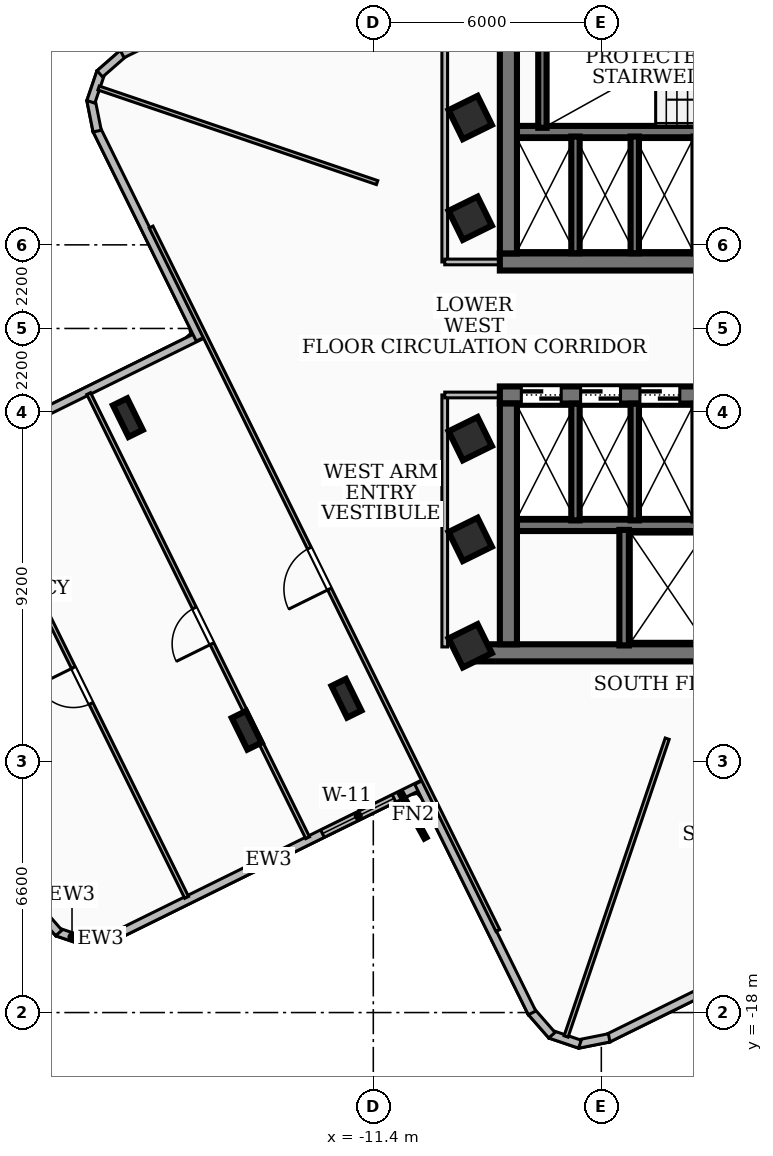
"""IFC4 building model, lengths in metres.
Left out: names, types, materials, properties, quantities, classifications, styles, units other than length and angle.
Written with IfcOpenShell. Run it as: python <this file> out.ifc"""

import sys

from ifc_helpers import new_model, si_unit, direction, frame, frame_2d, origin, origin_2d, place, context, subcontext, project, spatial, rectangle, i_section, extrude, element, fill, save


model = new_model("IFC4")
c1 = context("Model", 3, precision=1e-05, world=origin(), true_north=direction((0.0, 1.0)))
c2 = subcontext(c1, "Body", "Model", "MODEL_VIEW")
j1 = project(units=[si_unit("LENGTHUNIT", "METRE"), si_unit("PLANEANGLEUNIT", "RADIAN")], contexts=[c1])
p1 = place(None, origin())
s1 = spatial("IfcSite", under=j1, at=p1, CompositionType="ELEMENT")
p2 = place(p1, origin())
s2 = spatial("IfcBuilding", under=s1, at=p2, CompositionType="ELEMENT")
p3 = place(p2, frame((0.0, 0.0, 192.6)))
s3 = spatial("IfcBuildingStorey", under=s2, at=p3, CompositionType="ELEMENT", Elevation=192.6)
p4 = place(p3, frame((8.07, 1.75, 0.0), z_axis=(0.0, 0.0, 1.0), x_axis=(-1.0, 0.0, 0.0)))
e1 = element("IfcWall", 1, at=p4, inside=s3, PredefinedType="SHEAR", context=c2, shape_type="SweptSolid", body=[
    extrude(rectangle(XDim=16.14, YDim=0.45, at=frame_2d((8.07, 0.0))), origin(), (0.0, 0.0, 1.0), 3.2),
])
p5 = place(p4, frame((7.45, 0.0, 0.0)))
e2 = element("IfcOpeningElement", 2, at=p5, cuts=e1, PredefinedType="OPENING", context=c2, shape_type="SweptSolid", body=[
    extrude(rectangle(XDim=1.0, YDim=2.1, at=frame_2d((0.5, 1.05))), frame((0.0, 0.235, 0.0), z_axis=(0.0, -1.0, 0.0), x_axis=(1.0, 0.0, 0.0)), (0.0, 0.0, 1.0), 0.47),
])
p6 = place(p4, frame((3.4, 0.0, 0.0)))
e3 = element("IfcOpeningElement", 3, at=p6, cuts=e1, PredefinedType="OPENING", context=c2, shape_type="SweptSolid", body=[
    extrude(rectangle(XDim=0.9, YDim=2.06, at=frame_2d((0.45, 1.03))), frame((0.0, 0.235, 0.0), z_axis=(0.0, -1.0, 0.0), x_axis=(1.0, 0.0, 0.0)), (0.0, 0.0, 1.0), 0.47),
])
p7 = place(p4, frame((1.1, 0.0, 0.0)))
e4 = element("IfcOpeningElement", 4, at=p7, cuts=e1, PredefinedType="OPENING", context=c2, shape_type="SweptSolid", body=[
    extrude(rectangle(XDim=0.9, YDim=2.06, at=frame_2d((0.45, 1.03))), frame((0.0, 0.235, 0.0), z_axis=(0.0, -1.0, 0.0), x_axis=(1.0, 0.0, 0.0)), (0.0, 0.0, 1.0), 0.47),
])
p8 = place(p3, frame((-7.845, 1.975, 0.0), z_axis=(0.0, 0.0, 1.0), x_axis=(0.0, 1.0, 0.0)))
e5 = element("IfcWall", 5, at=p8, inside=s3, PredefinedType="SHEAR", context=c2, shape_type="SweptSolid", body=[
    extrude(rectangle(XDim=6.335, YDim=0.45, at=frame_2d((3.167, 0.0))), origin(), (0.0, 0.0, 1.0), 3.2),
])
p9 = place(p3, frame((7.62, 5.18, 0.0), z_axis=(0.0, 0.0, 1.0), x_axis=(-1.0, 0.0, 0.0)))
e6 = element("IfcWall", 6, at=p9, inside=s3, PredefinedType="SOLIDWALL", context=c2, shape_type="SweptSolid", body=[
    extrude(rectangle(XDim=15.24, YDim=0.3, at=frame_2d((7.62, 0.0))), origin(), (0.0, 0.0, 1.0), 3.2),
])
p10 = place(p9, frame((5.77, 0.0, 0.0)))
e7 = element("IfcOpeningElement", 7, at=p10, cuts=e6, PredefinedType="OPENING", context=c2, shape_type="SweptSolid", body=[
    extrude(rectangle(XDim=1.1, YDim=2.15, at=frame_2d((0.55, 1.075))), frame((0.0, 0.16, 0.0), z_axis=(0.0, -1.0, 0.0), x_axis=(1.0, 0.0, 0.0)), (0.0, 0.0, 1.0), 0.32),
])
p11 = place(p9, frame((2.97, 0.0, 0.0)))
e8 = element("IfcOpeningElement", 8, at=p11, cuts=e6, PredefinedType="OPENING", context=c2, shape_type="SweptSolid", body=[
    extrude(rectangle(XDim=1.1, YDim=2.15, at=frame_2d((0.55, 1.075))), frame((0.0, 0.16, 0.0), z_axis=(0.0, -1.0, 0.0), x_axis=(1.0, 0.0, 0.0)), (0.0, 0.0, 1.0), 0.32),
])
p12 = place(p9, frame((7.97, 0.0, 0.0)))
e9 = element("IfcOpeningElement", 9, at=p12, cuts=e6, PredefinedType="OPENING", context=c2, shape_type="SweptSolid", body=[
    extrude(rectangle(XDim=1.0, YDim=2.1, at=frame_2d((0.5, 1.05))), frame((0.0, 0.16, 0.0), z_axis=(0.0, -1.0, 0.0), x_axis=(1.0, 0.0, 0.0)), (0.0, 0.0, 1.0), 0.32),
])
p13 = place(p3, frame((8.78, -8.535, 0.0), z_axis=(0.0, 0.0, 1.0), x_axis=(-1.0, 0.0, 0.0)))
e10 = element("IfcWall", 10, at=p13, inside=s3, PredefinedType="SHEAR", context=c2, shape_type="SweptSolid", body=[
    extrude(rectangle(XDim=17.56, YDim=0.45, at=frame_2d((8.78, 0.0))), origin(), (0.0, 0.0, 1.0), 3.2),
])
p14 = place(p3, frame((-8.07, -1.75, 0.0), z_axis=(0.0, 0.0, 1.0), x_axis=(1.0, 0.0, 0.0)))
e11 = element("IfcWall", 11, at=p14, inside=s3, PredefinedType="SHEAR", context=c2, shape_type="SweptSolid", body=[
    extrude(rectangle(XDim=16.14, YDim=0.45, at=frame_2d((8.07, 0.0))), origin(), (0.0, 0.0, 1.0), 3.2),
])
p15 = place(p14, frame((7.45, 0.0, 0.0)))
e12 = element("IfcOpeningElement", 12, at=p15, cuts=e11, PredefinedType="OPENING", context=c2, shape_type="SweptSolid", body=[
    extrude(rectangle(XDim=1.0, YDim=2.1, at=frame_2d((0.5, 1.05))), frame((0.0, 0.235, 0.0), z_axis=(0.0, -1.0, 0.0), x_axis=(1.0, 0.0, 0.0)), (0.0, 0.0, 1.0), 0.47),
])
p16 = place(p14, frame((12.65, 0.0, 0.0)))
e13 = element("IfcOpeningElement", 13, at=p16, cuts=e11, PredefinedType="OPENING", context=c2, shape_type="SweptSolid", body=[
    extrude(rectangle(XDim=0.9, YDim=2.06, at=frame_2d((0.45, 1.03))), frame((0.0, 0.235, 0.0), z_axis=(0.0, -1.0, 0.0), x_axis=(1.0, 0.0, 0.0)), (0.0, 0.0, 1.0), 0.47),
])
p17 = place(p14, frame((0.565, 0.0, 0.0)))
e14 = element("IfcOpeningElement", 14, at=p17, cuts=e11, PredefinedType="OPENING", context=c2, shape_type="SweptSolid", body=[
    extrude(rectangle(XDim=1.05, YDim=2.15, at=frame_2d((0.525, 1.075))), frame((0.0, 0.235, 0.0), z_axis=(0.0, -1.0, 0.0), x_axis=(1.0, 0.0, 0.0)), (0.0, 0.0, 1.0), 0.47),
])
p18 = place(p14, frame((2.125, 0.0, 0.0)))
e15 = element("IfcOpeningElement", 15, at=p18, cuts=e11, PredefinedType="OPENING", context=c2, shape_type="SweptSolid", body=[
    extrude(rectangle(XDim=1.05, YDim=2.15, at=frame_2d((0.525, 1.075))), frame((0.0, 0.235, 0.0), z_axis=(0.0, -1.0, 0.0), x_axis=(1.0, 0.0, 0.0)), (0.0, 0.0, 1.0), 0.47),
])
p19 = place(p14, frame((3.685, 0.0, 0.0)))
e16 = element("IfcOpeningElement", 16, at=p19, cuts=e11, PredefinedType="OPENING", context=c2, shape_type="SweptSolid", body=[
    extrude(rectangle(XDim=1.05, YDim=2.15, at=frame_2d((0.525, 1.075))), frame((0.0, 0.235, 0.0), z_axis=(0.0, -1.0, 0.0), x_axis=(1.0, 0.0, 0.0)), (0.0, 0.0, 1.0), 0.47),
])
p20 = place(p3, frame((-7.845, -8.31, 0.0), z_axis=(0.0, 0.0, 1.0), x_axis=(0.0, 1.0, 0.0)))
e17 = element("IfcWall", 17, at=p20, inside=s3, PredefinedType="SHEAR", context=c2, shape_type="SweptSolid", body=[
    extrude(rectangle(XDim=6.335, YDim=0.45, at=frame_2d((3.167, 0.0))), origin(), (0.0, 0.0, 1.0), 3.2),
])
p21 = place(p3, frame((-7.62, -5.18, 0.0), z_axis=(0.0, 0.0, 1.0), x_axis=(1.0, 0.0, 0.0)))
e18 = element("IfcWall", 18, at=p21, inside=s3, PredefinedType="SOLIDWALL", context=c2, shape_type="SweptSolid", body=[
    extrude(rectangle(XDim=15.24, YDim=0.3, at=frame_2d((7.62, 0.0))), origin(), (0.0, 0.0, 1.0), 3.2),
])
p22 = place(p21, frame((5.77, 0.0, 0.0)))
e19 = element("IfcOpeningElement", 19, at=p22, cuts=e18, PredefinedType="OPENING", context=c2, shape_type="SweptSolid", body=[
    extrude(rectangle(XDim=1.1, YDim=2.15, at=frame_2d((0.55, 1.075))), frame((0.0, 0.16, 0.0), z_axis=(0.0, -1.0, 0.0), x_axis=(1.0, 0.0, 0.0)), (0.0, 0.0, 1.0), 0.32),
])
p23 = place(p21, frame((7.97, 0.0, 0.0)))
e20 = element("IfcOpeningElement", 20, at=p23, cuts=e18, PredefinedType="OPENING", context=c2, shape_type="SweptSolid", body=[
    extrude(rectangle(XDim=1.0, YDim=2.1, at=frame_2d((0.5, 1.05))), frame((0.0, 0.16, 0.0), z_axis=(0.0, -1.0, 0.0), x_axis=(1.0, 0.0, 0.0)), (0.0, 0.0, 1.0), 0.32),
])
p24 = place(p3, frame((-6.95, 5.28, 0.0), z_axis=(0.0, 0.0, 1.0), x_axis=(0.0, 1.0, 0.0)))
e21 = element("IfcWall", 21, at=p24, inside=s3, PredefinedType="SOLIDWALL", context=c2, shape_type="SweptSolid", body=[
    extrude(rectangle(XDim=3.06, YDim=0.22, at=frame_2d((1.53, 0.0))), origin(), (0.0, 0.0, 1.0), 3.2),
])
p25 = place(p3, frame((-4.8, -8.34, 0.0), z_axis=(0.0, 0.0, 1.0), x_axis=(0.0, 1.0, 0.0)))
e22 = element("IfcWall", 22, at=p25, inside=s3, PredefinedType="SOLIDWALL", context=c2, shape_type="SweptSolid", body=[
    extrude(rectangle(XDim=3.04, YDim=0.25, at=frame_2d((1.52, 0.0))), origin(), (0.0, 0.0, 1.0), 3.2),
])
for number, where, z_axis, x_axis in (
    (23, (-6.08, 1.98, 0.0), (0.0, 0.0, 1.0), (0.0, 1.0, 0.0)),
    (24, (-4.52, 1.98, 0.0), (0.0, 0.0, 1.0), (0.0, 1.0, 0.0)),
    (25, (-6.08, -5.05, 0.0), (0.0, 0.0, 1.0), (0.0, 1.0, 0.0)),
    (26, (-4.52, -5.05, 0.0), (0.0, 0.0, 1.0), (0.0, 1.0, 0.0)),
):
    element("IfcWall", number, at=place(p3, frame(where, z_axis=z_axis, x_axis=x_axis)), inside=s3, PredefinedType="SOLIDWALL", context=c2, shape_type="SweptSolid", body=[
        extrude(rectangle(XDim=3.07, YDim=0.22, at=frame_2d((1.535, 0.0))), origin(), (0.0, 0.0, 1.0), 3.2),
    ])
for number, where, z_axis, x_axis in (
    (27, (-8.85, -5.55, 0.0), (0.0, 0.0, 1.0), (0.897, 0.442, 0.0)),
    (28, (-8.85, -2.9, 0.0), (0.0, 0.0, 1.0), (0.897, 0.442, 0.0)),
    (29, (-8.85, 2.9, 0.0), (0.0, 0.0, 1.0), (0.897, 0.442, 0.0)),
    (30, (-8.85, 5.55, 0.0), (0.0, 0.0, 1.0), (0.897, 0.442, 0.0)),
    (31, (-8.85, -8.35, 0.0), (0.0, 0.0, 1.0), (0.897, 0.442, 0.0)),
):
    element("IfcColumn", number, at=place(p3, frame(where, z_axis=z_axis, x_axis=x_axis)), inside=s3, PredefinedType="COLUMN", context=c2, shape_type="SweptSolid", body=[
        extrude(rectangle(XDim=0.85, YDim=0.85, at=origin_2d()), origin(), (0.0, 0.0, 1.0), 3.6),
    ])
for number, where, z_axis, x_axis in (
    (32, (-17.858, -2.346, 0.0), (0.0, 0.0, 1.0), (0.897, 0.442, 0.0)),
    (33, (-12.106, -9.731, 0.0), (0.0, 0.0, 1.0), (0.897, 0.442, 0.0)),
    (34, (-14.731, -10.573, 0.0), (0.0, 0.0, 1.0), (0.897, 0.442, 0.0)),
):
    element("IfcColumn", number, at=place(p3, frame(where, z_axis=z_axis, x_axis=x_axis)), inside=s3, PredefinedType="COLUMN", context=c2, shape_type="SweptSolid", body=[
        extrude(i_section(OverallWidth=0.418, OverallDepth=0.927, WebThickness=0.019, FlangeThickness=0.032, at=origin_2d()), origin(), (0.0, 0.0, 1.0), 3.6),
    ])
p26 = place(p3, frame((-10.092, -11.988, 0.0), z_axis=(0.0, 0.0, 1.0), x_axis=(-0.89699971925, -0.442031111649, 0.0)))
e35 = element("IfcWall", 35, at=p26, inside=s3, PredefinedType="SOLIDWALL", context=c2, shape_type="SweptSolid", body=[
    extrude(rectangle(XDim=9.058, YDim=0.22, at=frame_2d((4.529, 0.0))), origin(), (0.0, 0.0, 1.0), 3.2),
])
p27 = place(p26, frame((0.85, 0.0, 0.85)))
e36 = element("IfcOpeningElement", 36, at=p27, cuts=e35, PredefinedType="OPENING", context=c2, shape_type="SweptSolid", body=[
    extrude(rectangle(XDim=2.1, YDim=1.6, at=frame_2d((1.05, 0.8))), frame((0.0, 0.12, 0.0), z_axis=(0.0, -1.0, 0.0), x_axis=(1.0, 0.0, 0.0)), (0.0, 0.0, 1.0), 0.24),
])
p28 = place(p3, frame((-18.17, -15.976, 0.0), z_axis=(0.0, 0.0, 1.0), x_axis=(-0.980804908934, -0.194991616769, 0.0)))
e37 = element("IfcWall", 37, at=p28, inside=s3, PredefinedType="SOLIDWALL", context=c2, shape_type="SweptSolid", body=[
    extrude(rectangle(XDim=0.835, YDim=0.22, at=frame_2d((0.417, 0.0))), origin(), (0.0, 0.0, 1.0), 3.2),
])
p29 = place(p3, frame((-18.94, -16.142, 0.0), z_axis=(0.0, 0.0, 1.0), x_axis=(-0.94703210012, 0.321138912843, 0.0)))
e38 = element("IfcWall", 38, at=p29, inside=s3, PredefinedType="SOLIDWALL", context=c2, shape_type="SweptSolid", body=[
    extrude(rectangle(XDim=0.82, YDim=0.22, at=frame_2d((0.41, 0.0))), origin(), (0.0, 0.0, 1.0), 3.2),
])
p30 = place(p3, frame((-19.676, -15.906, 0.0), z_axis=(0.0, 0.0, 1.0), x_axis=(-0.658255916404, 0.752794227209, 0.0)))
e39 = element("IfcWall", 39, at=p30, inside=s3, PredefinedType="SOLIDWALL", context=c2, shape_type="SweptSolid", body=[
    extrude(rectangle(XDim=0.834, YDim=0.22, at=frame_2d((0.417, 0.0))), origin(), (0.0, 0.0, 1.0), 3.2),
])
p31 = place(p3, frame((-24.044, -4.171, 0.0), z_axis=(0.0, 0.0, 1.0), x_axis=(0.896935893297, 0.442160608055, 0.0)))
e40 = element("IfcWall", 40, at=p31, inside=s3, PredefinedType="SOLIDWALL", context=c2, shape_type="SweptSolid", body=[
    extrude(rectangle(XDim=9.058, YDim=0.22, at=frame_2d((4.529, 0.0))), origin(), (0.0, 0.0, 1.0), 3.2),
])
p32 = place(p3, frame((-15.96, -0.284, 0.0), z_axis=(0.0, 0.0, 1.0), x_axis=(-0.442004580174, 0.897012793167, 0.0)))
e41 = element("IfcWall", 41, at=p32, inside=s3, PredefinedType="SOLIDWALL", context=c2, shape_type="SweptSolid", body=[
    extrude(rectangle(XDim=6.158, YDim=0.22, at=frame_2d((3.079, 0.0))), origin(), (0.0, 0.0, 1.0), 3.2),
])
p33 = place(p3, frame((-18.666, 5.193, 0.0), z_axis=(0.0, 0.0, 1.0), x_axis=(-0.19532881852, 0.980737810353, 0.0)))
e42 = element("IfcWall", 42, at=p33, inside=s3, PredefinedType="SOLIDWALL", context=c2, shape_type="SweptSolid", body=[
    extrude(rectangle(XDim=0.835, YDim=0.22, at=frame_2d((0.417, 0.0))), origin(), (0.0, 0.0, 1.0), 3.2),
])
p34 = place(p3, frame((-18.832, 5.963, 0.0), z_axis=(0.0, 0.0, 1.0), x_axis=(0.320509908962, 0.947245162699, 0.0)))
e43 = element("IfcWall", 43, at=p34, inside=s3, PredefinedType="SOLIDWALL", context=c2, shape_type="SweptSolid", body=[
    extrude(rectangle(XDim=0.82, YDim=0.22, at=frame_2d((0.41, 0.0))), origin(), (0.0, 0.0, 1.0), 3.2),
])
p35 = place(p3, frame((-18.596, 6.7, 0.0), z_axis=(0.0, 0.0, 1.0), x_axis=(0.752794227209, 0.658255916404, 0.0)))
e44 = element("IfcWall", 44, at=p35, inside=s3, PredefinedType="SOLIDWALL", context=c2, shape_type="SweptSolid", body=[
    extrude(rectangle(XDim=0.834, YDim=0.22, at=frame_2d((0.417, 0.0))), origin(), (0.0, 0.0, 1.0), 3.2),
])
p36 = place(p3, frame((-18.009, 7.222, 0.0), z_axis=(0.0, 0.0, 1.0), x_axis=(0.896927600032, 0.44217743079, 0.0)))
e45 = element("IfcWall", 45, at=p36, inside=s3, PredefinedType="SOLIDWALL", context=c2, shape_type="SweptSolid", body=[
    extrude(rectangle(XDim=6.758, YDim=0.22, at=frame_2d((3.379, 0.0))), origin(), (0.0, 0.0, 1.0), 3.2),
])
p37 = place(p3, frame((0.284, -15.96, 0.0), z_axis=(0.0, 0.0, 1.0), x_axis=(-0.897012793167, -0.442004580174, 0.0)))
e46 = element("IfcWall", 46, at=p37, inside=s3, PredefinedType="SOLIDWALL", context=c2, shape_type="SweptSolid", body=[
    extrude(rectangle(XDim=6.158, YDim=0.22, at=frame_2d((3.079, 0.0))), origin(), (0.0, 0.0, 1.0), 3.2),
])
p38 = place(p3, frame((-5.193, -18.666, 0.0), z_axis=(0.0, 0.0, 1.0), x_axis=(-0.980737810353, -0.19532881852, 0.0)))
e47 = element("IfcWall", 47, at=p38, inside=s3, PredefinedType="SOLIDWALL", context=c2, shape_type="SweptSolid", body=[
    extrude(rectangle(XDim=0.835, YDim=0.22, at=frame_2d((0.417, 0.0))), origin(), (0.0, 0.0, 1.0), 3.2),
])
p39 = place(p3, frame((-5.963, -18.832, 0.0), z_axis=(0.0, 0.0, 1.0), x_axis=(-0.947245162699, 0.320509908962, 0.0)))
e48 = element("IfcWall", 48, at=p39, inside=s3, PredefinedType="SOLIDWALL", context=c2, shape_type="SweptSolid", body=[
    extrude(rectangle(XDim=0.82, YDim=0.22, at=frame_2d((0.41, 0.0))), origin(), (0.0, 0.0, 1.0), 3.2),
])
p40 = place(p3, frame((-6.7, -18.596, 0.0), z_axis=(0.0, 0.0, 1.0), x_axis=(-0.658255916404, 0.752794227209, 0.0)))
e49 = element("IfcWall", 49, at=p40, inside=s3, PredefinedType="SOLIDWALL", context=c2, shape_type="SweptSolid", body=[
    extrude(rectangle(XDim=0.834, YDim=0.22, at=frame_2d((0.417, 0.0))), origin(), (0.0, 0.0, 1.0), 3.2),
])
p41 = place(p3, frame((-7.222, -18.009, 0.0), z_axis=(0.0, 0.0, 1.0), x_axis=(-0.44217743079, 0.896927600032, 0.0)))
e50 = element("IfcWall", 50, at=p41, inside=s3, PredefinedType="SOLIDWALL", context=c2, shape_type="SweptSolid", body=[
    extrude(rectangle(XDim=6.758, YDim=0.22, at=frame_2d((3.379, 0.0))), origin(), (0.0, 0.0, 1.0), 3.2),
])
p42 = place(p3, frame((-9.52, 1.75, 0.0), z_axis=(0.0, 0.0, 1.0), x_axis=(0.0, 1.0, 0.0)))
e51 = element("IfcWall", 51, at=p42, inside=s3, PredefinedType="PARTITIONING", context=c2, shape_type="SweptSolid", body=[
    extrude(rectangle(XDim=6.63, YDim=0.15, at=frame_2d((3.315, 0.0))), origin(), (0.0, 0.0, 1.0), 3.2),
])
p43 = place(p3, frame((-7.85, 1.75, 0.0), z_axis=(0.0, 0.0, 1.0), x_axis=(-1.0, 0.0, 0.0)))
e52 = element("IfcWall", 52, at=p43, inside=s3, PredefinedType="PARTITIONING", context=c2, shape_type="SweptSolid", body=[
    extrude(rectangle(XDim=1.67, YDim=0.15, at=frame_2d((0.835, 0.0))), origin(), (0.0, 0.0, 1.0), 2.43),
])
p44 = place(p3, frame((-9.52, -8.38, 0.0), z_axis=(0.0, 0.0, 1.0), x_axis=(0.0, 1.0, 0.0)))
e53 = element("IfcWall", 53, at=p44, inside=s3, PredefinedType="PARTITIONING", context=c2, shape_type="SweptSolid", body=[
    extrude(rectangle(XDim=6.63, YDim=0.15, at=frame_2d((3.315, 0.0))), origin(), (0.0, 0.0, 1.0), 2.504),
])
p45 = place(p3, frame((-7.85, -1.75, 0.0), z_axis=(0.0, 0.0, 1.0), x_axis=(-1.0, 0.0, 0.0)))
e54 = element("IfcWall", 54, at=p45, inside=s3, PredefinedType="PARTITIONING", context=c2, shape_type="SweptSolid", body=[
    extrude(rectangle(XDim=1.67, YDim=0.15, at=frame_2d((0.835, 0.0))), origin(), (0.0, 0.0, 1.0), 2.43),
])
p46 = place(p3, frame((-11.3, 3.838, 0.0), z_axis=(0.0, 0.0, 1.0), x_axis=(-0.946882857271, 0.321578691158, 0.0)))
e55 = element("IfcWall", 55, at=p46, inside=s3, PredefinedType="PARTITIONING", context=c2, shape_type="SweptSolid", body=[
    extrude(rectangle(XDim=7.74, YDim=0.11, at=frame_2d((3.87, 0.0))), origin(), (0.0, 0.0, 1.0), 3.2),
])
p47 = place(p3, frame((-3.666, -10.794, 0.0), z_axis=(0.0, 0.0, 1.0), x_axis=(-0.32157793417, -0.946883114357, 0.0)))
e56 = element("IfcWall", 56, at=p47, inside=s3, PredefinedType="PARTITIONING", context=c2, shape_type="SweptSolid", body=[
    extrude(rectangle(XDim=8.274, YDim=0.11, at=frame_2d((4.137, 0.0))), origin(), (0.0, 0.0, 1.0), 3.2),
])
p48 = place(p3, frame((-8.122, -15.843, 0.0), z_axis=(0.0, 0.0, 1.0), x_axis=(-0.442129285211, 0.896951333774, 0.0)))
e57 = element("IfcWall", 57, at=p48, inside=s3, PredefinedType="PARTITIONING", context=c2, shape_type="SweptSolid", body=[
    extrude(rectangle(XDim=20.639, YDim=0.11, at=frame_2d((10.319, 0.0))), origin(), (0.0, 0.0, 1.0), 2.504),
])
p49 = place(p48, frame((10.02, 0.0, 0.0)))
e58 = element("IfcOpeningElement", 58, at=p49, cuts=e57, PredefinedType="OPENING", context=c2, shape_type="SweptSolid", body=[
    extrude(rectangle(XDim=1.2, YDim=2.1, at=frame_2d((0.6, 1.05))), frame((0.0, 0.065, 0.0), z_axis=(0.0, -1.0, 0.0), x_axis=(1.0, 0.0, 0.0)), (0.0, 0.0, 1.0), 0.13),
])
p50 = place(p3, frame((-13.128, -13.4, 0.0), z_axis=(0.0, 0.0, 1.0), x_axis=(-0.442139902385, 0.896946100231, 0.0)))
e59 = element("IfcWall", 59, at=p50, inside=s3, PredefinedType="PARTITIONING", context=c2, shape_type="SweptSolid", body=[
    extrude(rectangle(XDim=13.03, YDim=0.11, at=frame_2d((6.515, 0.0))), origin(), (0.0, 0.0, 1.0), 2.504),
])
p51 = place(p50, frame((5.69, 0.0, 0.0)))
e60 = element("IfcOpeningElement", 60, at=p51, cuts=e59, PredefinedType="OPENING", context=c2, shape_type="SweptSolid", body=[
    extrude(rectangle(XDim=1.05, YDim=2.08, at=frame_2d((0.525, 1.04))), frame((0.0, 0.065, 0.0), z_axis=(0.0, -1.0, 0.0), x_axis=(1.0, 0.0, 0.0)), (0.0, 0.0, 1.0), 0.13),
])
p52 = place(p3, frame((-16.312, -14.97, 0.0), z_axis=(0.0, 0.0, 1.0), x_axis=(-0.442139902385, 0.896946100231, 0.0)))
e61 = element("IfcWall", 61, at=p52, inside=s3, PredefinedType="PARTITIONING", context=c2, shape_type="SweptSolid", body=[
    extrude(rectangle(XDim=13.03, YDim=0.11, at=frame_2d((6.515, 0.0))), origin(), (0.0, 0.0, 1.0), 3.2),
])
p53 = place(p52, frame((5.69, 0.0, 0.0)))
e62 = element("IfcOpeningElement", 62, at=p53, cuts=e61, PredefinedType="OPENING", context=c2, shape_type="SweptSolid", body=[
    extrude(rectangle(XDim=1.05, YDim=2.08, at=frame_2d((0.525, 1.04))), frame((0.0, 0.065, 0.0), z_axis=(0.0, -1.0, 0.0), x_axis=(1.0, 0.0, 0.0)), (0.0, 0.0, 1.0), 0.13),
])
p54 = place(p27, origin())
e63 = element("IfcWindow", 63, at=p54, inside=s3, PartitioningType="SINGLE_PANEL", PredefinedType="WINDOW", context=c2, shape_type="SweptSolid", body=[
    extrude(rectangle(XDim=2.1, YDim=1.6, at=frame_2d((1.05, 0.8))), frame((0.0, 0.03, 0.0), z_axis=(0.0, -1.0, 0.0), x_axis=(1.0, 0.0, 0.0)), (0.0, 0.0, 1.0), 0.06),
])
fill(e36, e63)
p55 = place(p17, origin())
e64 = element("IfcDoor", 64, at=p55, inside=s3, OperationType="DOUBLE_DOOR_SLIDING", PredefinedType="DOOR", context=c2, shape_type="SweptSolid", body=[
    extrude(rectangle(XDim=1.05, YDim=2.15, at=frame_2d((0.525, 1.075))), frame((0.0, 0.025, 0.0), z_axis=(0.0, -1.0, 0.0), x_axis=(1.0, 0.0, 0.0)), (0.0, 0.0, 1.0), 0.05),
])
fill(e14, e64)
p56 = place(p18, origin())
e65 = element("IfcDoor", 65, at=p56, inside=s3, OperationType="DOUBLE_DOOR_SLIDING", PredefinedType="DOOR", context=c2, shape_type="SweptSolid", body=[
    extrude(rectangle(XDim=1.05, YDim=2.15, at=frame_2d((0.525, 1.075))), frame((0.0, 0.025, 0.0), z_axis=(0.0, -1.0, 0.0), x_axis=(1.0, 0.0, 0.0)), (0.0, 0.0, 1.0), 0.05),
])
fill(e15, e65)
p57 = place(p19, origin())
e66 = element("IfcDoor", 66, at=p57, inside=s3, OperationType="DOUBLE_DOOR_SLIDING", PredefinedType="DOOR", context=c2, shape_type="SweptSolid", body=[
    extrude(rectangle(XDim=1.05, YDim=2.15, at=frame_2d((0.525, 1.075))), frame((0.0, 0.025, 0.0), z_axis=(0.0, -1.0, 0.0), x_axis=(1.0, 0.0, 0.0)), (0.0, 0.0, 1.0), 0.05),
])
fill(e16, e66)
p58 = place(p49, origin())
e67 = element("IfcDoor", 67, at=p58, inside=s3, OperationType="SINGLE_SWING_LEFT", PredefinedType="DOOR", context=c2, shape_type="SweptSolid", body=[
    extrude(rectangle(XDim=1.2, YDim=2.1, at=frame_2d((0.6, 1.05))), frame((0.0, 0.025, 0.0), z_axis=(0.0, -1.0, 0.0), x_axis=(1.0, 0.0, 0.0)), (0.0, 0.0, 1.0), 0.05),
])
fill(e58, e67)
p59 = place(p51, origin())
e68 = element("IfcDoor", 68, at=p59, inside=s3, OperationType="SINGLE_SWING_LEFT", PredefinedType="DOOR", context=c2, shape_type="SweptSolid", body=[
    extrude(rectangle(XDim=1.05, YDim=2.08, at=frame_2d((0.525, 1.04))), frame((0.0, 0.025, 0.0), z_axis=(0.0, -1.0, 0.0), x_axis=(1.0, 0.0, 0.0)), (0.0, 0.0, 1.0), 0.05),
])
fill(e60, e68)
p60 = place(p53, origin())
e69 = element("IfcDoor", 69, at=p60, inside=s3, OperationType="SINGLE_SWING_RIGHT", PredefinedType="DOOR", context=c2, shape_type="SweptSolid", body=[
    extrude(rectangle(XDim=1.05, YDim=2.08, at=frame_2d((0.525, 1.04))), frame((0.0, 0.025, 0.0), z_axis=(0.0, -1.0, 0.0), x_axis=(1.0, 0.0, 0.0)), (0.0, 0.0, 1.0), 0.05),
])
fill(e62, e69)
save(model, sys.argv[1])
